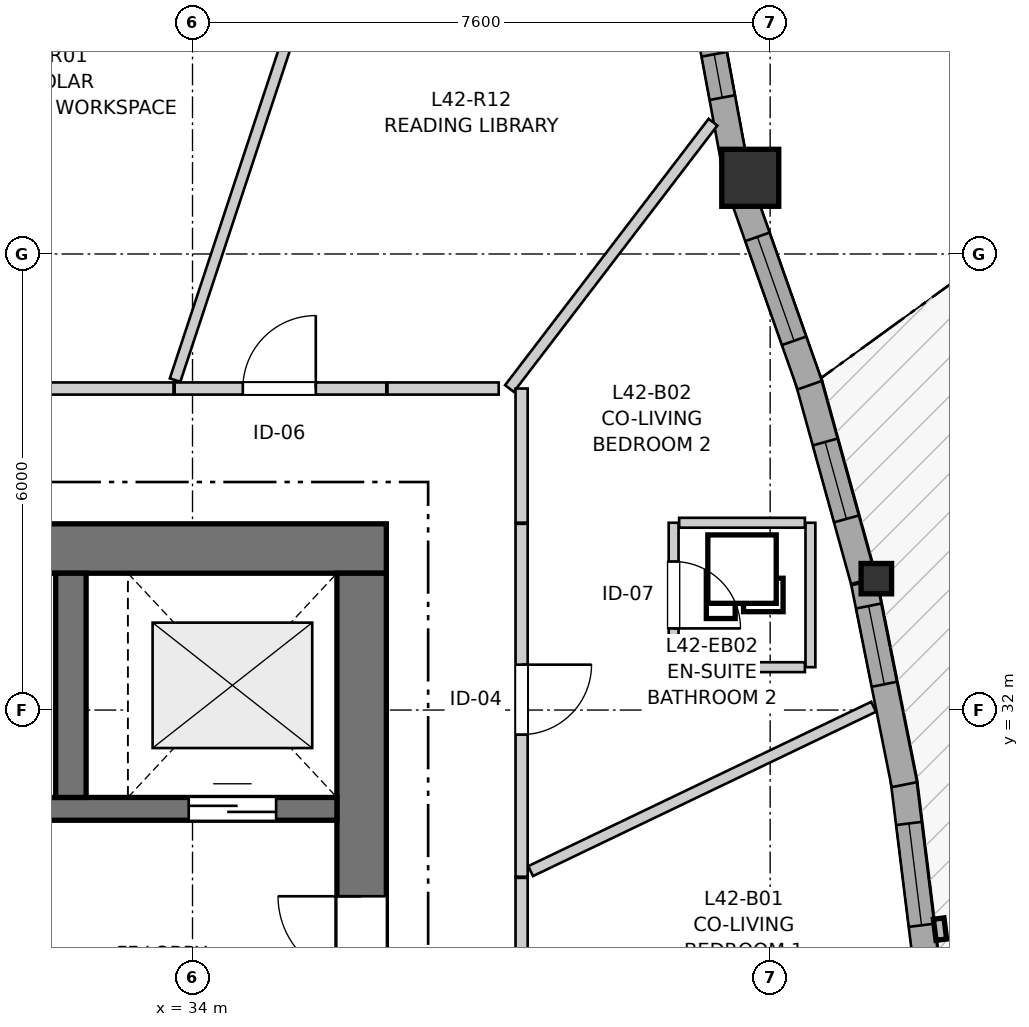
"""IFC4 building model, lengths in metres.
Left out: names, types, materials, properties, quantities, classifications, styles, units other than length and angle.
Written with IfcOpenShell. Run it as: python <this file> out.ifc"""

import sys

from ifc_helpers import new_model, si_unit, direction, frame, frame_2d, origin, origin_2d, place, context, subcontext, project, spatial, rectangle, i_section, extrude, source, transform, mapped, element, fill, save


model = new_model("IFC4")
c1 = context("Model", 3, precision=1e-05, world=origin(), true_north=direction((0.0, 1.0)))
c2 = subcontext(c1, "Body", "Model", "MODEL_VIEW")
j1 = project(units=[si_unit("LENGTHUNIT", "METRE"), si_unit("PLANEANGLEUNIT", "RADIAN")], contexts=[c1])
p1 = place(None, origin())
s1 = spatial("IfcSite", under=j1, at=p1, CompositionType="ELEMENT")
p2 = place(p1, origin())
s2 = spatial("IfcBuilding", under=s1, at=p2, CompositionType="ELEMENT")
p3 = place(p2, frame((0.0, 0.0, 142.6)))
s3 = spatial("IfcBuildingStorey", under=s2, at=p3, CompositionType="ELEMENT", Elevation=142.6)
p4 = place(p3, frame((36.55, 34.125, 0.0), z_axis=(0.0, 0.0, 1.0), x_axis=(-1.0, 0.0, 0.0)))
e1 = element("IfcWall", 1, at=p4, inside=s3, PredefinedType="SHEAR", context=c2, shape_type="SweptSolid", body=[
    extrude(rectangle(XDim=12.4, YDim=0.65, at=frame_2d((6.2, 0.0))), origin(), (0.0, 0.0, 1.0), 2.95),
])
p5 = place(p3, frame((36.225, 18.2, 0.0), z_axis=(0.0, 0.0, 1.0), x_axis=(0.0, 1.0, 0.0)))
e2 = element("IfcWall", 2, at=p5, inside=s3, PredefinedType="SHEAR", context=c2, shape_type="SweptSolid", body=[
    extrude(rectangle(XDim=15.6, YDim=0.65, at=frame_2d((7.8, 0.0))), origin(), (0.0, 0.0, 1.0), 2.95),
])
p6 = place(p5, frame((4.25, 0.0, 0.0)))
e3 = element("IfcOpeningElement", 3, at=p6, cuts=e2, PredefinedType="OPENING", context=c2, shape_type="SweptSolid", body=[
    extrude(rectangle(XDim=1.1, YDim=2.15, at=frame_2d((0.55, 1.075))), frame((0.0, 0.335, 0.0), z_axis=(0.0, -1.0, 0.0), x_axis=(1.0, 0.0, 0.0)), (0.0, 0.0, 1.0), 0.67),
])
p7 = place(p5, frame((10.25, 0.0, 0.0)))
e4 = element("IfcOpeningElement", 4, at=p7, cuts=e2, PredefinedType="OPENING", context=c2, shape_type="SweptSolid", body=[
    extrude(rectangle(XDim=1.1, YDim=2.15, at=frame_2d((0.55, 1.075))), frame((0.0, 0.335, 0.0), z_axis=(0.0, -1.0, 0.0), x_axis=(1.0, 0.0, 0.0)), (0.0, 0.0, 1.0), 0.67),
])
p8 = place(p3, frame((24.8, 30.7, 0.0), z_axis=(0.0, 0.0, 1.0), x_axis=(1.0, 0.0, 0.0)))
e5 = element("IfcWall", 5, at=p8, inside=s3, PredefinedType="SHEAR", context=c2, shape_type="SweptSolid", body=[
    extrude(rectangle(XDim=11.1, YDim=0.3, at=frame_2d((5.55, 0.0))), origin(), (0.0, 0.0, 1.0), 2.95),
])
p9 = place(p8, frame((6.22, 0.0, 0.0)))
e6 = element("IfcOpeningElement", 6, at=p9, cuts=e5, PredefinedType="OPENING", context=c2, shape_type="SweptSolid", body=[
    extrude(rectangle(XDim=0.98, YDim=2.15, at=frame_2d((0.49, 1.075))), frame((0.0, 0.16, 0.0), z_axis=(0.0, -1.0, 0.0), x_axis=(1.0, 0.0, 0.0)), (0.0, 0.0, 1.0), 0.32),
])
p10 = place(p8, frame((9.15, 0.0, 0.0)))
e7 = element("IfcOpeningElement", 7, at=p10, cuts=e5, PredefinedType="OPENING", context=c2, shape_type="SweptSolid", body=[
    extrude(rectangle(XDim=1.15, YDim=2.15, at=frame_2d((0.575, 1.075))), frame((0.0, 0.16, 0.0), z_axis=(0.0, -1.0, 0.0), x_axis=(1.0, 0.0, 0.0)), (0.0, 0.0, 1.0), 0.32),
])
p11 = place(p3, frame((32.4, 30.85, 0.0), z_axis=(0.0, 0.0, 1.0), x_axis=(0.0, 1.0, 0.0)))
e8 = element("IfcWall", 8, at=p11, inside=s3, PredefinedType="SHEAR", context=c2, shape_type="SweptSolid", body=[
    extrude(rectangle(XDim=2.95, YDim=0.4, at=frame_2d((1.475, 0.0))), origin(), (0.0, 0.0, 1.0), 2.95),
])
m1 = source(origin(), c2, "Body", "SweptSolid", [
    extrude(i_section(OverallWidth=0.401, OverallDepth=0.399, WebThickness=0.023, FlangeThickness=0.036, FilletRadius=0.015, at=origin_2d()), origin(), (0.0, 0.0, 1.0), 2.95),
])
p12 = place(p3, frame((42.997, 33.729, 0.0), z_axis=(0.0, 0.0, 1.0), x_axis=(1.0, 0.0, 0.0)))
e9 = element("IfcColumn", 9, at=p12, inside=s3, PredefinedType="PILASTER", context=c2, shape_type="MappedRepresentation", body=[
    mapped(m1, transform((0.0, 0.0, 0.0), x_axis=(1.0, 0.0, 0.0), y_axis=(0.0, 1.0, 0.0), z_axis=(0.0, 0.0, 1.0), scale=1.0)),
])
m2 = source(origin(), c2, "Body", "SweptSolid", [
    extrude(rectangle(XDim=0.75, YDim=0.75, at=origin_2d()), origin(), (0.0, 0.0, 1.0), 2.95),
])
p13 = place(p3, frame((41.338, 39.002, 0.0), z_axis=(0.0, 0.0, 1.0), x_axis=(1.0, 0.0, 0.0)))
e10 = element("IfcColumn", 10, at=p13, inside=s3, PredefinedType="COLUMN", context=c2, shape_type="MappedRepresentation", body=[
    mapped(m2, transform((0.0, 0.0, 0.0), x_axis=(1.0, 0.0, 0.0), y_axis=(0.0, 1.0, 0.0), z_axis=(0.0, 0.0, 1.0), scale=1.0)),
])
p14 = place(p3, frame((43.664, 28.58, 0.0), z_axis=(0.0, 0.0, 1.0), x_axis=(-0.122794881762, 0.992432071737, 0.0)))
e11 = element("IfcWall", 11, at=p14, inside=s3, PredefinedType="SOLIDWALL", context=c2, shape_type="SweptSolid", body=[
    extrude(rectangle(XDim=2.545, YDim=0.34, at=frame_2d((1.272, 0.0))), origin(), (0.0, 0.0, 1.0), 2.53),
])
p15 = place(p14, frame((0.592, 0.0, 0.82)))
e12 = element("IfcOpeningElement", 12, at=p15, cuts=e11, PredefinedType="OPENING", context=c2, shape_type="SweptSolid", body=[
    extrude(rectangle(XDim=1.35, YDim=1.45, at=frame_2d((0.675, 0.725))), frame((0.0, 0.18, 0.0), z_axis=(0.0, -1.0, 0.0), x_axis=(1.0, 0.0, 0.0)), (0.0, 0.0, 1.0), 0.36),
])
p16 = place(p3, frame((43.366, 31.018, 0.0), z_axis=(0.0, 0.0, 1.0), x_axis=(-0.196116135138, 0.980580675691, 0.0)))
e13 = element("IfcWall", 13, at=p16, inside=s3, PredefinedType="SOLIDWALL", context=c2, shape_type="SweptSolid", body=[
    extrude(rectangle(XDim=2.71, YDim=0.34, at=frame_2d((1.355, 0.0))), origin(), (0.0, 0.0, 1.0), 2.53),
])
p17 = place(p16, frame((1.347, 0.0, 0.82)))
e14 = element("IfcOpeningElement", 14, at=p17, cuts=e13, PredefinedType="OPENING", context=c2, shape_type="SweptSolid", body=[
    extrude(rectangle(XDim=1.05, YDim=1.45, at=frame_2d((0.525, 0.725))), frame((0.0, 0.18, 0.0), z_axis=(0.0, -1.0, 0.0), x_axis=(1.0, 0.0, 0.0)), (0.0, 0.0, 1.0), 0.36),
])
p18 = place(p3, frame((42.828, 33.703, 0.0), z_axis=(0.0, 0.0, 1.0), x_axis=(-0.266340796898, 0.963878923884, 0.0)))
e15 = element("IfcWall", 15, at=p18, inside=s3, PredefinedType="SOLIDWALL", context=c2, shape_type="SweptSolid", body=[
    extrude(rectangle(XDim=2.755, YDim=0.34, at=frame_2d((1.377, 0.0))), origin(), (0.0, 0.0, 1.0), 2.53),
])
p19 = place(p18, frame((0.842, 0.0, 0.82)))
e16 = element("IfcOpeningElement", 16, at=p19, cuts=e15, PredefinedType="OPENING", context=c2, shape_type="SweptSolid", body=[
    extrude(rectangle(XDim=1.05, YDim=1.45, at=frame_2d((0.525, 0.725))), frame((0.0, 0.18, 0.0), z_axis=(0.0, -1.0, 0.0), x_axis=(1.0, 0.0, 0.0)), (0.0, 0.0, 1.0), 0.36),
])
p20 = place(p3, frame((42.121, 36.274, 0.0), z_axis=(0.0, 0.0, 1.0), x_axis=(-0.332724751299, 0.943023986902, 0.0)))
e17 = element("IfcWall", 17, at=p20, inside=s3, PredefinedType="SOLIDWALL", context=c2, shape_type="SweptSolid", body=[
    extrude(rectangle(XDim=2.678, YDim=0.34, at=frame_2d((1.339, 0.0))), origin(), (0.0, 0.0, 1.0), 2.53),
])
p21 = place(p20, frame((0.619, 0.0, 0.82)))
e18 = element("IfcOpeningElement", 18, at=p21, cuts=e17, PredefinedType="OPENING", context=c2, shape_type="SweptSolid", body=[
    extrude(rectangle(XDim=1.45, YDim=1.25, at=frame_2d((0.725, 0.625))), frame((0.0, 0.18, 0.0), z_axis=(0.0, -1.0, 0.0), x_axis=(1.0, 0.0, 0.0)), (0.0, 0.0, 1.0), 0.36),
])
p22 = place(p3, frame((41.143, 39.124, 0.0), z_axis=(0.0, 0.0, 1.0), x_axis=(-0.182320770307, 0.983239104549, 0.0)))
e19 = element("IfcWall", 19, at=p22, inside=s3, PredefinedType="SOLIDWALL", context=c2, shape_type="SweptSolid", body=[
    extrude(rectangle(XDim=1.888, YDim=0.34, at=frame_2d((0.944, 0.0))), origin(), (0.0, 0.0, 1.0), 2.53),
])
p23 = place(p22, frame((0.949, 0.0, 0.82)))
e20 = element("IfcOpeningElement", 20, at=p23, cuts=e19, PredefinedType="OPENING", context=c2, shape_type="SweptSolid", body=[
    extrude(rectangle(XDim=0.58, YDim=1.35, at=frame_2d((0.29, 0.675))), frame((0.0, 0.18, 0.0), z_axis=(0.0, -1.0, 0.0), x_axis=(1.0, 0.0, 0.0)), (0.0, 0.0, 1.0), 0.36),
])
p24 = place(p3, frame((27.975, 36.23, 0.0), z_axis=(0.0, 0.0, 1.0), x_axis=(1.0, 0.0, 0.0)))
e21 = element("IfcWall", 21, at=p24, inside=s3, PredefinedType="PARTITIONING", context=c2, shape_type="SweptSolid", body=[
    extrude(rectangle(XDim=5.775, YDim=0.16, at=frame_2d((2.887, 0.0))), origin(), (0.0, 0.0, 1.0), 2.588),
])
p25 = place(p24, frame((2.407, 0.0, 0.0)))
e22 = element("IfcOpeningElement", 22, at=p25, cuts=e21, PredefinedType="OPENING", context=c2, shape_type="SweptSolid", body=[
    extrude(rectangle(XDim=0.96, YDim=2.1, at=frame_2d((0.48, 1.05))), frame((0.0, 0.09, 0.0), z_axis=(0.0, -1.0, 0.0), x_axis=(1.0, 0.0, 0.0)), (0.0, 0.0, 1.0), 0.18),
])
p26 = place(p3, frame((38.33, 34.45, 0.0), z_axis=(0.0, 0.0, 1.0), x_axis=(0.0, -1.0, 0.0)))
e23 = element("IfcWall", 23, at=p26, inside=s3, PredefinedType="PARTITIONING", context=c2, shape_type="SweptSolid", body=[
    extrude(rectangle(XDim=4.643, YDim=0.16, at=frame_2d((2.322, 0.0))), origin(), (0.0, 0.0, 1.0), 2.588),
])
p27 = place(p26, frame((1.853, 0.0, 0.0)))
e24 = element("IfcOpeningElement", 24, at=p27, cuts=e23, PredefinedType="OPENING", context=c2, shape_type="SweptSolid", body=[
    extrude(rectangle(XDim=0.92, YDim=2.1, at=frame_2d((0.46, 1.05))), frame((0.0, 0.09, 0.0), z_axis=(0.0, -1.0, 0.0), x_axis=(1.0, 0.0, 0.0)), (0.0, 0.0, 1.0), 0.18),
])
p28 = place(p3, frame((38.33, 29.792, 0.0), z_axis=(0.0, 0.0, 1.0), x_axis=(0.0, -1.0, 0.0)))
e25 = element("IfcWall", 25, at=p28, inside=s3, PredefinedType="PARTITIONING", context=c2, shape_type="SweptSolid", body=[
    extrude(rectangle(XDim=4.564, YDim=0.16, at=frame_2d((2.282, 0.0))), origin(), (0.0, 0.0, 1.0), 2.95),
])
p29 = place(p28, frame((1.798, 0.0, 0.0)))
e26 = element("IfcOpeningElement", 26, at=p29, cuts=e25, PredefinedType="OPENING", context=c2, shape_type="SweptSolid", body=[
    extrude(rectangle(XDim=0.92, YDim=2.1, at=frame_2d((0.46, 1.05))), frame((0.0, 0.09, 0.0), z_axis=(0.0, -1.0, 0.0), x_axis=(1.0, 0.0, 0.0)), (0.0, 0.0, 1.0), 0.18),
])
p30 = place(p3, frame((33.765, 36.23, 0.0), z_axis=(0.0, 0.0, 1.0), x_axis=(1.0, 0.0, 0.0)))
e27 = element("IfcWall", 27, at=p30, inside=s3, PredefinedType="PARTITIONING", context=c2, shape_type="SweptSolid", body=[
    extrude(rectangle(XDim=2.785, YDim=0.16, at=frame_2d((1.393, 0.0))), origin(), (0.0, 0.0, 1.0), 2.588),
])
p31 = place(p30, frame((0.897, 0.0, 0.0)))
e28 = element("IfcOpeningElement", 28, at=p31, cuts=e27, PredefinedType="OPENING", context=c2, shape_type="SweptSolid", body=[
    extrude(rectangle(XDim=0.96, YDim=2.1, at=frame_2d((0.48, 1.05))), frame((0.0, 0.09, 0.0), z_axis=(0.0, -1.0, 0.0), x_axis=(1.0, 0.0, 0.0)), (0.0, 0.0, 1.0), 0.18),
])
p32 = place(p3, frame((40.33, 34.464, 0.0), z_axis=(0.0, 0.0, 1.0), x_axis=(0.0, -1.0, 0.0)))
e29 = element("IfcWall", 29, at=p32, inside=s3, PredefinedType="PARTITIONING", context=c2, shape_type="SweptSolid", body=[
    extrude(rectangle(XDim=1.9, YDim=0.13, at=frame_2d((0.95, 0.0))), origin(), (0.0, 0.0, 1.0), 2.558),
])
p33 = place(p32, frame((0.51, 0.0, 0.0)))
e30 = element("IfcOpeningElement", 30, at=p33, cuts=e29, PredefinedType="OPENING", context=c2, shape_type="SweptSolid", body=[
    extrude(rectangle(XDim=0.88, YDim=2.05, at=frame_2d((0.44, 1.025))), frame((0.0, 0.075, 0.0), z_axis=(0.0, -1.0, 0.0), x_axis=(1.0, 0.0, 0.0)), (0.0, 0.0, 1.0), 0.15),
])
p34 = place(p3, frame((33.771, 36.34, 0.0), z_axis=(0.0, 0.0, 1.0), x_axis=(0.314080540859, 0.949396341816, 0.0)))
e31 = element("IfcWall", 31, at=p34, inside=s3, PredefinedType="PARTITIONING", context=c2, shape_type="SweptSolid", body=[
    extrude(rectangle(XDim=8.394, YDim=0.145, at=frame_2d((4.197, 0.0))), origin(), (0.0, 0.0, 1.0), 2.95),
])
p35 = place(p3, frame((38.448, 29.881, 0.0), z_axis=(0.0, 0.0, 1.0), x_axis=(0.901842564972, 0.432064796072, 0.0)))
e32 = element("IfcWall", 32, at=p35, inside=s3, PredefinedType="PARTITIONING", context=c2, shape_type="SweptSolid", body=[
    extrude(rectangle(XDim=5.004, YDim=0.145, at=frame_2d((2.502, 0.0))), origin(), (0.0, 0.0, 1.0), 2.95),
])
p36 = place(p3, frame((38.17, 36.23, 0.0), z_axis=(0.0, 0.0, 1.0), x_axis=(0.607203490548, 0.794546361811, 0.0)))
e33 = element("IfcWall", 33, at=p36, inside=s3, PredefinedType="PARTITIONING", context=c2, shape_type="SweptSolid", body=[
    extrude(rectangle(XDim=4.41, YDim=0.145, at=frame_2d((2.205, 0.0))), origin(), (0.0, 0.0, 1.0), 2.95),
])
p37 = place(p3, frame((42.13, 32.564, 0.0), z_axis=(0.0, 0.0, 1.0), x_axis=(0.0, 1.0, 0.0)))
e34 = element("IfcWall", 34, at=p37, inside=s3, PredefinedType="PARTITIONING", context=c2, shape_type="SweptSolid", body=[
    extrude(rectangle(XDim=1.9, YDim=0.13, at=frame_2d((0.95, 0.0))), origin(), (0.0, 0.0, 1.0), 2.95),
])
for number, where, z_axis, x_axis in (
    (35, (40.403, 34.464, 0.0), (0.0, 0.0, 1.0), (1.0, 0.0, 0.0)),
    (36, (40.403, 32.564, 0.0), (0.0, 0.0, 1.0), (1.0, 0.0, 0.0)),
):
    element("IfcWall", number, at=place(p3, frame(where, z_axis=z_axis, x_axis=x_axis)), inside=s3, PredefinedType="PARTITIONING", context=c2, shape_type="SweptSolid", body=[
        extrude(rectangle(XDim=1.654, YDim=0.13, at=frame_2d((0.827, 0.0))), origin(), (0.0, 0.0, 1.0), 2.95),
    ])
p38 = place(p3, frame((38.33, 34.465, 0.0), z_axis=(0.0, 0.0, 1.0), x_axis=(0.0, 1.0, 0.0)))
e37 = element("IfcWall", 37, at=p38, inside=s3, PredefinedType="PARTITIONING", context=c2, shape_type="SweptSolid", body=[
    extrude(rectangle(XDim=1.765, YDim=0.16, at=frame_2d((0.882, 0.0))), origin(), (0.0, 0.0, 1.0), 2.588),
])
p39 = place(p3, frame((36.565, 36.23, 0.0), z_axis=(0.0, 0.0, 1.0), x_axis=(1.0, 0.0, 0.0)))
e38 = element("IfcWall", 38, at=p39, inside=s3, PredefinedType="PARTITIONING", context=c2, shape_type="SweptSolid", body=[
    extrude(rectangle(XDim=1.464, YDim=0.16, at=frame_2d((0.732, 0.0))), origin(), (0.0, 0.0, 1.0), 2.95),
])
m3 = source(origin(), c2, "Body", "SweptSolid", [
    extrude(rectangle(XDim=1.35, YDim=1.45, at=frame_2d((0.675, 0.725))), frame((0.0, 0.03, 0.0), z_axis=(0.0, -1.0, 0.0), x_axis=(1.0, 0.0, 0.0)), (0.0, 0.0, 1.0), 0.06),
])
p40 = place(p15, origin())
e39 = element("IfcWindow", 39, at=p40, inside=s3, PartitioningType="SINGLE_PANEL", PredefinedType="WINDOW", context=c2, shape_type="MappedRepresentation", body=[
    mapped(m3, transform((0.0, 0.0, 0.0), x_axis=(1.0, 0.0, 0.0), y_axis=(0.0, 1.0, 0.0), z_axis=(0.0, 0.0, 1.0), scale=1.0)),
])
fill(e12, e39)
m4 = source(origin(), c2, "Body", "SweptSolid", [
    extrude(rectangle(XDim=1.05, YDim=1.45, at=frame_2d((0.525, 0.725))), frame((0.0, 0.03, 0.0), z_axis=(0.0, -1.0, 0.0), x_axis=(1.0, 0.0, 0.0)), (0.0, 0.0, 1.0), 0.06),
])
p41 = place(p17, origin())
e40 = element("IfcWindow", 40, at=p41, inside=s3, PartitioningType="SINGLE_PANEL", PredefinedType="WINDOW", context=c2, shape_type="MappedRepresentation", body=[
    mapped(m4, transform((0.0, 0.0, 0.0), x_axis=(1.0, 0.0, 0.0), y_axis=(0.0, 1.0, 0.0), z_axis=(0.0, 0.0, 1.0), scale=1.0)),
])
fill(e14, e40)
p42 = place(p19, origin())
e41 = element("IfcWindow", 41, at=p42, inside=s3, PartitioningType="SINGLE_PANEL", PredefinedType="WINDOW", context=c2, shape_type="MappedRepresentation", body=[
    mapped(m4, transform((0.0, 0.0, 0.0), x_axis=(1.0, 0.0, 0.0), y_axis=(0.0, 1.0, 0.0), z_axis=(0.0, 0.0, 1.0), scale=1.0)),
])
fill(e16, e41)
m5 = source(origin(), c2, "Body", "SweptSolid", [
    extrude(rectangle(XDim=1.45, YDim=1.25, at=frame_2d((0.725, 0.625))), frame((0.0, 0.03, 0.0), z_axis=(0.0, -1.0, 0.0), x_axis=(1.0, 0.0, 0.0)), (0.0, 0.0, 1.0), 0.06),
])
p43 = place(p21, origin())
e42 = element("IfcWindow", 42, at=p43, inside=s3, PartitioningType="SINGLE_PANEL", PredefinedType="WINDOW", context=c2, shape_type="MappedRepresentation", body=[
    mapped(m5, transform((0.0, 0.0, 0.0), x_axis=(1.0, 0.0, 0.0), y_axis=(0.0, 1.0, 0.0), z_axis=(0.0, 0.0, 1.0), scale=1.0)),
])
fill(e18, e42)
m6 = source(origin(), c2, "Body", "SweptSolid", [
    extrude(rectangle(XDim=0.58, YDim=1.35, at=frame_2d((0.29, 0.675))), frame((0.0, 0.03, 0.0), z_axis=(0.0, -1.0, 0.0), x_axis=(1.0, 0.0, 0.0)), (0.0, 0.0, 1.0), 0.06),
])
p44 = place(p23, origin())
e43 = element("IfcWindow", 43, at=p44, inside=s3, PartitioningType="SINGLE_PANEL", PredefinedType="WINDOW", context=c2, shape_type="MappedRepresentation", body=[
    mapped(m6, transform((0.0, 0.0, 0.0), x_axis=(1.0, 0.0, 0.0), y_axis=(0.0, 1.0, 0.0), z_axis=(0.0, 0.0, 1.0), scale=1.0)),
])
fill(e20, e43)
m7 = source(origin(), c2, "Body", "SweptSolid", [
    extrude(rectangle(XDim=1.15, YDim=2.15, at=frame_2d((0.575, 1.075))), frame((0.0, 0.025, 0.0), z_axis=(0.0, -1.0, 0.0), x_axis=(1.0, 0.0, 0.0)), (0.0, 0.0, 1.0), 0.05),
])
p45 = place(p10, origin())
e44 = element("IfcDoor", 44, at=p45, inside=s3, OperationType="DOUBLE_DOOR_SLIDING", PredefinedType="DOOR", context=c2, shape_type="MappedRepresentation", body=[
    mapped(m7, transform((0.0, 0.0, 0.0), x_axis=(1.0, 0.0, 0.0), y_axis=(0.0, 1.0, 0.0), z_axis=(0.0, 0.0, 1.0), scale=1.0)),
])
fill(e7, e44)
m8 = source(origin(), c2, "Body", "SweptSolid", [
    extrude(rectangle(XDim=1.1, YDim=2.15, at=frame_2d((0.55, 1.075))), frame((0.0, 0.025, 0.0), z_axis=(0.0, -1.0, 0.0), x_axis=(1.0, 0.0, 0.0)), (0.0, 0.0, 1.0), 0.05),
])
p46 = place(p7, origin())
e45 = element("IfcDoor", 45, at=p46, inside=s3, OperationType="SINGLE_SWING_RIGHT", PredefinedType="DOOR", context=c2, shape_type="MappedRepresentation", body=[
    mapped(m8, transform((0.0, 0.0, 0.0), x_axis=(1.0, 0.0, 0.0), y_axis=(0.0, 1.0, 0.0), z_axis=(0.0, 0.0, 1.0), scale=1.0)),
])
fill(e4, e45)
m9 = source(origin(), c2, "Body", "SweptSolid", [
    extrude(rectangle(XDim=0.92, YDim=2.1, at=frame_2d((0.46, 1.05))), frame((0.0, 0.025, 0.0), z_axis=(0.0, -1.0, 0.0), x_axis=(1.0, 0.0, 0.0)), (0.0, 0.0, 1.0), 0.05),
])
p47 = place(p27, origin())
e46 = element("IfcDoor", 46, at=p47, inside=s3, OperationType="SINGLE_SWING_LEFT", PredefinedType="DOOR", context=c2, shape_type="MappedRepresentation", body=[
    mapped(m9, transform((0.0, 0.0, 0.0), x_axis=(1.0, 0.0, 0.0), y_axis=(0.0, 1.0, 0.0), z_axis=(0.0, 0.0, 1.0), scale=1.0)),
])
fill(e24, e46)
m10 = source(origin(), c2, "Body", "SweptSolid", [
    extrude(rectangle(XDim=0.96, YDim=2.1, at=frame_2d((0.48, 1.05))), frame((0.0, 0.025, 0.0), z_axis=(0.0, -1.0, 0.0), x_axis=(1.0, 0.0, 0.0)), (0.0, 0.0, 1.0), 0.05),
])
p48 = place(p31, origin())
e47 = element("IfcDoor", 47, at=p48, inside=s3, OperationType="SINGLE_SWING_RIGHT", PredefinedType="DOOR", context=c2, shape_type="MappedRepresentation", body=[
    mapped(m10, transform((0.0, 0.0, 0.0), x_axis=(1.0, 0.0, 0.0), y_axis=(0.0, 1.0, 0.0), z_axis=(0.0, 0.0, 1.0), scale=1.0)),
])
fill(e28, e47)
m11 = source(origin(), c2, "Body", "SweptSolid", [
    extrude(rectangle(XDim=0.88, YDim=2.05, at=frame_2d((0.44, 1.025))), frame((0.0, 0.025, 0.0), z_axis=(0.0, -1.0, 0.0), x_axis=(1.0, 0.0, 0.0)), (0.0, 0.0, 1.0), 0.05),
])
p49 = place(p33, origin())
e48 = element("IfcDoor", 48, at=p49, inside=s3, OperationType="SINGLE_SWING_RIGHT", PredefinedType="DOOR", context=c2, shape_type="MappedRepresentation", body=[
    mapped(m11, transform((0.0, 0.0, 0.0), x_axis=(1.0, 0.0, 0.0), y_axis=(0.0, 1.0, 0.0), z_axis=(0.0, 0.0, 1.0), scale=1.0)),
])
fill(e30, e48)
save(model, sys.argv[1])
